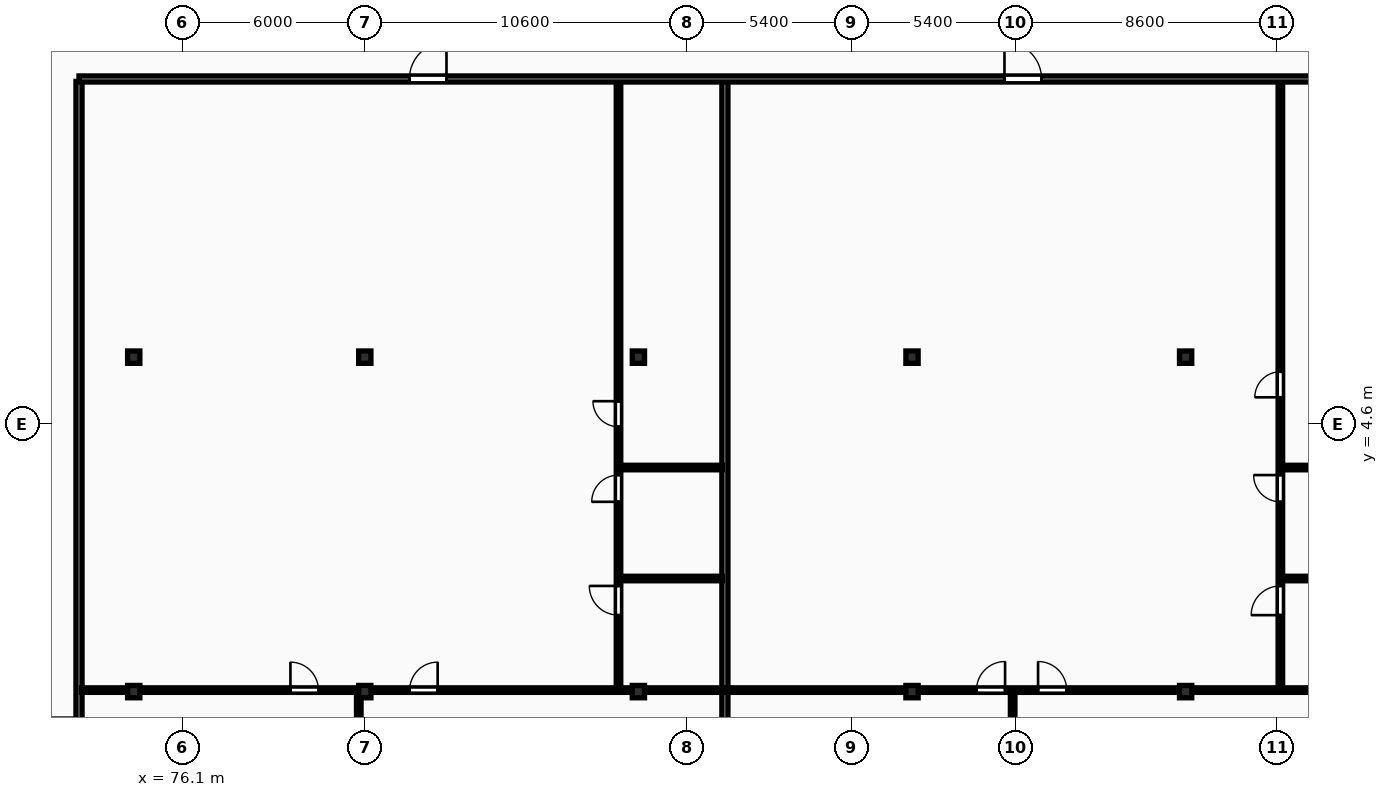
"""IFC4 building model, lengths in metres.
Left out: names, types, materials, properties, quantities, classifications, styles, units other than length and angle.
Written with IfcOpenShell. Run it as: python <this file> out.ifc"""

import sys

from ifc_helpers import new_model, si_unit, direction, frame, frame_2d, origin, origin_2d, place, context, subcontext, project, spatial, rectangle, i_section, extrude, element, fill, save


model = new_model("IFC4")
c1 = context("Model", 3, precision=1e-05, world=origin(), true_north=direction((0.0, 1.0)))
c2 = subcontext(c1, "Body", "Model", "MODEL_VIEW")
j1 = project(units=[si_unit("LENGTHUNIT", "METRE"), si_unit("PLANEANGLEUNIT", "RADIAN")], contexts=[c1])
p1 = place(None, origin())
s1 = spatial("IfcSite", under=j1, at=p1, CompositionType="ELEMENT")
p2 = place(p1, origin())
s2 = spatial("IfcBuilding", under=s1, at=p2, CompositionType="ELEMENT")
p3 = place(p2, frame((0.0, 0.0, 150.1)))
s3 = spatial("IfcBuildingStorey", under=s2, at=p3, CompositionType="ELEMENT", Elevation=150.1)
for number, where, z_axis, x_axis in (
    (1, (74.5, -4.2, 0.0), (0.0, 0.0, 1.0), (1.0, 0.0, 0.0)),
    (2, (74.5, 6.8, 0.0), (0.0, 0.0, 1.0), (1.0, 0.0, 0.0)),
    (3, (82.1, -4.2, 0.0), (0.0, 0.0, 1.0), (1.0, 0.0, 0.0)),
    (4, (82.1, 6.8, 0.0), (0.0, 0.0, 1.0), (1.0, 0.0, 0.0)),
    (5, (91.1, -4.2, 0.0), (0.0, 0.0, 1.0), (1.0, 0.0, 0.0)),
    (6, (91.1, 6.8, 0.0), (0.0, 0.0, 1.0), (1.0, 0.0, 0.0)),
    (7, (100.1, -4.2, 0.0), (0.0, 0.0, 1.0), (1.0, 0.0, 0.0)),
    (8, (100.1, 6.8, 0.0), (0.0, 0.0, 1.0), (1.0, 0.0, 0.0)),
    (9, (109.1, -4.2, 0.0), (0.0, 0.0, 1.0), (1.0, 0.0, 0.0)),
    (10, (109.1, 6.8, 0.0), (0.0, 0.0, 1.0), (1.0, 0.0, 0.0)),
):
    element("IfcColumn", number, at=place(p3, frame(where, z_axis=z_axis, x_axis=x_axis)), inside=s3, PredefinedType="COLUMN", context=c2, shape_type="SweptSolid", body=[
        extrude(i_section(OverallWidth=0.403, OverallDepth=0.406, WebThickness=0.027, FlangeThickness=0.043, FilletRadius=0.015, at=origin_2d()), origin(), (0.0, 0.0, 1.0), 3.6),
    ])
for number, where, z_axis, x_axis in (
    (11, (72.7, -8.7, 0.0), (0.0, 0.0, 1.0), (0.0, 1.0, 0.0)),
    (12, (93.946, -8.7, 0.0), (0.0, 0.0, 1.0), (0.0, 1.0, 0.0)),
):
    element("IfcWall", number, at=place(p3, frame(where, z_axis=z_axis, x_axis=x_axis)), inside=s3, PredefinedType="PARTITIONING", context=c2, shape_type="SweptSolid", body=[
        extrude(rectangle(XDim=24.57, YDim=0.2, at=frame_2d((12.285, 0.0))), origin(), (0.0, 0.0, 1.0), 3.31),
    ])
for number, where, z_axis, x_axis in (
    (13, (90.506, -0.48, 0.0), (0.0, 0.0, 1.0), (1.0, 0.0, 0.0)),
    (14, (90.506, 3.17, 0.0), (0.0, 0.0, 1.0), (1.0, 0.0, 0.0)),
):
    element("IfcWall", number, at=place(p3, frame(where, z_axis=z_axis, x_axis=x_axis)), inside=s3, PredefinedType="PARTITIONING", context=c2, shape_type="SweptSolid", body=[
        extrude(rectangle(XDim=3.36, YDim=0.15, at=frame_2d((1.68, 0.0))), origin(), (0.0, 0.0, 1.0), 3.31),
    ])
p4 = place(p3, frame((90.446, -4.09, 0.0), z_axis=(0.0, 0.0, 1.0), x_axis=(0.0, 1.0, 0.0)))
e15 = element("IfcWall", 15, at=p4, inside=s3, PredefinedType="PARTITIONING", context=c2, shape_type="SweptSolid", body=[
    extrude(rectangle(XDim=19.98, YDim=0.15, at=frame_2d((9.99, 0.0))), origin(), (0.0, 0.0, 1.0), 3.31),
])
p5 = place(p4, frame((2.406, 0.0, 0.0)))
e16 = element("IfcOpeningElement", 16, at=p5, cuts=e15, PredefinedType="OPENING", context=c2, shape_type="SweptSolid", body=[
    extrude(rectangle(XDim=0.96, YDim=2.1, at=frame_2d((0.48, 1.05))), frame((0.0, 0.085, 0.0), z_axis=(0.0, -1.0, 0.0), x_axis=(1.0, 0.0, 0.0)), (0.0, 0.0, 1.0), 0.17),
])
p6 = place(p4, frame((6.133, 0.0, 0.0)))
e17 = element("IfcOpeningElement", 17, at=p6, cuts=e15, PredefinedType="OPENING", context=c2, shape_type="SweptSolid", body=[
    extrude(rectangle(XDim=0.88, YDim=2.06, at=frame_2d((0.44, 1.03))), frame((0.0, 0.085, 0.0), z_axis=(0.0, -1.0, 0.0), x_axis=(1.0, 0.0, 0.0)), (0.0, 0.0, 1.0), 0.17),
])
p7 = place(p4, frame((8.602, 0.0, 0.0)))
e18 = element("IfcOpeningElement", 18, at=p7, cuts=e15, PredefinedType="OPENING", context=c2, shape_type="SweptSolid", body=[
    extrude(rectangle(XDim=0.84, YDim=2.04, at=frame_2d((0.42, 1.02))), frame((0.0, 0.085, 0.0), z_axis=(0.0, -1.0, 0.0), x_axis=(1.0, 0.0, 0.0)), (0.0, 0.0, 1.0), 0.17),
])
p8 = place(p3, frame((81.903, -8.7, 0.0), z_axis=(0.0, 0.0, 1.0), x_axis=(0.0, 1.0, 0.0)))
e19 = element("IfcWall", 19, at=p8, inside=s3, PredefinedType="PARTITIONING", context=c2, shape_type="SweptSolid", body=[
    extrude(rectangle(XDim=4.47, YDim=0.15, at=frame_2d((2.235, 0.0))), origin(), (0.0, 0.0, 1.0), 3.31),
])
p9 = place(p3, frame((72.78, -4.15, 0.0), z_axis=(0.0, 0.0, 1.0), x_axis=(1.0, 0.0, 0.0)))
e20 = element("IfcWall", 20, at=p9, inside=s3, PredefinedType="PARTITIONING", context=c2, shape_type="SweptSolid", body=[
    extrude(rectangle(XDim=21.085, YDim=0.15, at=frame_2d((10.543, 0.0))), origin(), (0.0, 0.0, 1.0), 3.003),
])
p10 = place(p9, frame((6.874, 0.0, 0.0)))
e21 = element("IfcOpeningElement", 21, at=p10, cuts=e20, PredefinedType="OPENING", context=c2, shape_type="SweptSolid", body=[
    extrude(rectangle(XDim=0.92, YDim=2.08, at=frame_2d((0.46, 1.04))), frame((0.0, 0.085, 0.0), z_axis=(0.0, -1.0, 0.0), x_axis=(1.0, 0.0, 0.0)), (0.0, 0.0, 1.0), 0.17),
])
p11 = place(p9, frame((10.797, 0.0, 0.0)))
e22 = element("IfcOpeningElement", 22, at=p11, cuts=e20, PredefinedType="OPENING", context=c2, shape_type="SweptSolid", body=[
    extrude(rectangle(XDim=0.92, YDim=2.08, at=frame_2d((0.46, 1.04))), frame((0.0, 0.085, 0.0), z_axis=(0.0, -1.0, 0.0), x_axis=(1.0, 0.0, 0.0)), (0.0, 0.0, 1.0), 0.17),
])
for number, where, z_axis, x_axis in (
    (23, (112.276, -0.48, 0.0), (0.0, 0.0, 1.0), (1.0, 0.0, 0.0)),
    (24, (112.276, 3.17, 0.0), (0.0, 0.0, 1.0), (1.0, 0.0, 0.0)),
):
    element("IfcWall", number, at=place(p3, frame(where, z_axis=z_axis, x_axis=x_axis)), inside=s3, PredefinedType="PARTITIONING", context=c2, shape_type="SweptSolid", body=[
        extrude(rectangle(XDim=3.13, YDim=0.15, at=frame_2d((1.565, 0.0))), origin(), (0.0, 0.0, 1.0), 3.31),
    ])
p12 = place(p3, frame((112.216, -4.09, 0.0), z_axis=(0.0, 0.0, 1.0), x_axis=(0.0, 1.0, 0.0)))
e25 = element("IfcWall", 25, at=p12, inside=s3, PredefinedType="PARTITIONING", context=c2, shape_type="SweptSolid", body=[
    extrude(rectangle(XDim=19.98, YDim=0.15, at=frame_2d((9.99, 0.0))), origin(), (0.0, 0.0, 1.0), 3.31),
])
p13 = place(p12, frame((2.406, 0.0, 0.0)))
e26 = element("IfcOpeningElement", 26, at=p13, cuts=e25, PredefinedType="OPENING", context=c2, shape_type="SweptSolid", body=[
    extrude(rectangle(XDim=0.96, YDim=2.1, at=frame_2d((0.48, 1.05))), frame((0.0, 0.085, 0.0), z_axis=(0.0, -1.0, 0.0), x_axis=(1.0, 0.0, 0.0)), (0.0, 0.0, 1.0), 0.17),
])
p14 = place(p12, frame((6.133, 0.0, 0.0)))
e27 = element("IfcOpeningElement", 27, at=p14, cuts=e25, PredefinedType="OPENING", context=c2, shape_type="SweptSolid", body=[
    extrude(rectangle(XDim=0.88, YDim=2.06, at=frame_2d((0.44, 1.03))), frame((0.0, 0.085, 0.0), z_axis=(0.0, -1.0, 0.0), x_axis=(1.0, 0.0, 0.0)), (0.0, 0.0, 1.0), 0.17),
])
p15 = place(p12, frame((9.57, 0.0, 0.0)))
e28 = element("IfcOpeningElement", 28, at=p15, cuts=e25, PredefinedType="OPENING", context=c2, shape_type="SweptSolid", body=[
    extrude(rectangle(XDim=0.84, YDim=2.04, at=frame_2d((0.42, 1.02))), frame((0.0, 0.085, 0.0), z_axis=(0.0, -1.0, 0.0), x_axis=(1.0, 0.0, 0.0)), (0.0, 0.0, 1.0), 0.17),
])
p16 = place(p3, frame((103.411, -8.7, 0.0), z_axis=(0.0, 0.0, 1.0), x_axis=(0.0, 1.0, 0.0)))
e29 = element("IfcWall", 29, at=p16, inside=s3, PredefinedType="PARTITIONING", context=c2, shape_type="SweptSolid", body=[
    extrude(rectangle(XDim=4.47, YDim=0.15, at=frame_2d((2.235, 0.0))), origin(), (0.0, 0.0, 1.0), 3.31),
])
p17 = place(p3, frame((94.025, -4.15, 0.0), z_axis=(0.0, 0.0, 1.0), x_axis=(1.0, 0.0, 0.0)))
e30 = element("IfcWall", 30, at=p17, inside=s3, PredefinedType="PARTITIONING", context=c2, shape_type="SweptSolid", body=[
    extrude(rectangle(XDim=21.381, YDim=0.15, at=frame_2d((10.69, 0.0))), origin(), (0.0, 0.0, 1.0), 3.003),
])
p18 = place(p17, frame((8.195, 0.0, 0.0)))
e31 = element("IfcOpeningElement", 31, at=p18, cuts=e30, PredefinedType="OPENING", context=c2, shape_type="SweptSolid", body=[
    extrude(rectangle(XDim=0.94, YDim=2.1, at=frame_2d((0.47, 1.05))), frame((0.0, 0.085, 0.0), z_axis=(0.0, -1.0, 0.0), x_axis=(1.0, 0.0, 0.0)), (0.0, 0.0, 1.0), 0.17),
])
p19 = place(p17, frame((10.22, 0.0, 0.0)))
e32 = element("IfcOpeningElement", 32, at=p19, cuts=e30, PredefinedType="OPENING", context=c2, shape_type="SweptSolid", body=[
    extrude(rectangle(XDim=0.94, YDim=2.1, at=frame_2d((0.47, 1.05))), frame((0.0, 0.085, 0.0), z_axis=(0.0, -1.0, 0.0), x_axis=(1.0, 0.0, 0.0)), (0.0, 0.0, 1.0), 0.17),
])
p20 = place(p3, frame((72.7, 15.95, 0.0), z_axis=(0.0, 0.0, 1.0), x_axis=(1.0, 0.0, 0.0)))
e33 = element("IfcWall", 33, at=p20, inside=s3, PredefinedType="PARTITIONING", context=c2, shape_type="SweptSolid", body=[
    extrude(rectangle(XDim=58.0, YDim=0.2, at=frame_2d((29.0, 0.0))), origin(), (0.0, 0.0, 1.0), 3.31),
])
p21 = place(p20, frame((10.868, 0.0, 0.0)))
e34 = element("IfcOpeningElement", 34, at=p21, cuts=e33, PredefinedType="OPENING", context=c2, shape_type="SweptSolid", body=[
    extrude(rectangle(XDim=1.22, YDim=2.18, at=frame_2d((0.61, 1.09))), frame((0.0, 0.11, 0.0), z_axis=(0.0, -1.0, 0.0), x_axis=(1.0, 0.0, 0.0)), (0.0, 0.0, 1.0), 0.22),
])
p22 = place(p20, frame((30.441, 0.0, 0.0)))
e35 = element("IfcOpeningElement", 35, at=p22, cuts=e33, PredefinedType="OPENING", context=c2, shape_type="SweptSolid", body=[
    extrude(rectangle(XDim=1.22, YDim=2.18, at=frame_2d((0.61, 1.09))), frame((0.0, 0.11, 0.0), z_axis=(0.0, -1.0, 0.0), x_axis=(1.0, 0.0, 0.0)), (0.0, 0.0, 1.0), 0.22),
])
p23 = place(p20, frame((44.831, 0.0, 0.0)))
e36 = element("IfcOpeningElement", 36, at=p23, cuts=e33, PredefinedType="OPENING", context=c2, shape_type="SweptSolid", body=[
    extrude(rectangle(XDim=0.95, YDim=2.15, at=frame_2d((0.475, 1.075))), frame((0.0, 0.11, 0.0), z_axis=(0.0, -1.0, 0.0), x_axis=(1.0, 0.0, 0.0)), (0.0, 0.0, 1.0), 0.22),
])
p24 = place(p5, origin())
e37 = element("IfcDoor", 37, at=p24, inside=s3, OperationType="SINGLE_SWING_RIGHT", PredefinedType="DOOR", context=c2, shape_type="SweptSolid", body=[
    extrude(rectangle(XDim=0.96, YDim=2.1, at=frame_2d((0.48, 1.05))), frame((0.0, 0.025, 0.0), z_axis=(0.0, -1.0, 0.0), x_axis=(1.0, 0.0, 0.0)), (0.0, 0.0, 1.0), 0.05),
])
fill(e16, e37)
p25 = place(p6, origin())
e38 = element("IfcDoor", 38, at=p25, inside=s3, OperationType="SINGLE_SWING_LEFT", PredefinedType="DOOR", context=c2, shape_type="SweptSolid", body=[
    extrude(rectangle(XDim=0.88, YDim=2.06, at=frame_2d((0.44, 1.03))), frame((0.0, 0.025, 0.0), z_axis=(0.0, -1.0, 0.0), x_axis=(1.0, 0.0, 0.0)), (0.0, 0.0, 1.0), 0.05),
])
fill(e17, e38)
p26 = place(p7, origin())
e39 = element("IfcDoor", 39, at=p26, inside=s3, OperationType="SINGLE_SWING_RIGHT", PredefinedType="DOOR", context=c2, shape_type="SweptSolid", body=[
    extrude(rectangle(XDim=0.84, YDim=2.04, at=frame_2d((0.42, 1.02))), frame((0.0, 0.025, 0.0), z_axis=(0.0, -1.0, 0.0), x_axis=(1.0, 0.0, 0.0)), (0.0, 0.0, 1.0), 0.05),
])
fill(e18, e39)
p27 = place(p10, origin())
e40 = element("IfcDoor", 40, at=p27, inside=s3, OperationType="SINGLE_SWING_LEFT", PredefinedType="DOOR", context=c2, shape_type="SweptSolid", body=[
    extrude(rectangle(XDim=0.92, YDim=2.08, at=frame_2d((0.46, 1.04))), frame((0.0, 0.025, 0.0), z_axis=(0.0, -1.0, 0.0), x_axis=(1.0, 0.0, 0.0)), (0.0, 0.0, 1.0), 0.05),
])
fill(e21, e40)
p28 = place(p11, origin())
e41 = element("IfcDoor", 41, at=p28, inside=s3, OperationType="SINGLE_SWING_RIGHT", PredefinedType="DOOR", context=c2, shape_type="SweptSolid", body=[
    extrude(rectangle(XDim=0.92, YDim=2.08, at=frame_2d((0.46, 1.04))), frame((0.0, 0.025, 0.0), z_axis=(0.0, -1.0, 0.0), x_axis=(1.0, 0.0, 0.0)), (0.0, 0.0, 1.0), 0.05),
])
fill(e22, e41)
p29 = place(p13, origin())
e42 = element("IfcDoor", 42, at=p29, inside=s3, OperationType="SINGLE_SWING_LEFT", PredefinedType="DOOR", context=c2, shape_type="SweptSolid", body=[
    extrude(rectangle(XDim=0.96, YDim=2.1, at=frame_2d((0.48, 1.05))), frame((0.0, 0.025, 0.0), z_axis=(0.0, -1.0, 0.0), x_axis=(1.0, 0.0, 0.0)), (0.0, 0.0, 1.0), 0.05),
])
fill(e26, e42)
p30 = place(p14, origin())
e43 = element("IfcDoor", 43, at=p30, inside=s3, OperationType="SINGLE_SWING_RIGHT", PredefinedType="DOOR", context=c2, shape_type="SweptSolid", body=[
    extrude(rectangle(XDim=0.88, YDim=2.06, at=frame_2d((0.44, 1.03))), frame((0.0, 0.025, 0.0), z_axis=(0.0, -1.0, 0.0), x_axis=(1.0, 0.0, 0.0)), (0.0, 0.0, 1.0), 0.05),
])
fill(e27, e43)
p31 = place(p15, origin())
e44 = element("IfcDoor", 44, at=p31, inside=s3, OperationType="SINGLE_SWING_LEFT", PredefinedType="DOOR", context=c2, shape_type="SweptSolid", body=[
    extrude(rectangle(XDim=0.84, YDim=2.04, at=frame_2d((0.42, 1.02))), frame((0.0, 0.025, 0.0), z_axis=(0.0, -1.0, 0.0), x_axis=(1.0, 0.0, 0.0)), (0.0, 0.0, 1.0), 0.05),
])
fill(e28, e44)
p32 = place(p18, origin())
e45 = element("IfcDoor", 45, at=p32, inside=s3, OperationType="SINGLE_SWING_RIGHT", PredefinedType="DOOR", context=c2, shape_type="SweptSolid", body=[
    extrude(rectangle(XDim=0.94, YDim=2.1, at=frame_2d((0.47, 1.05))), frame((0.0, 0.025, 0.0), z_axis=(0.0, -1.0, 0.0), x_axis=(1.0, 0.0, 0.0)), (0.0, 0.0, 1.0), 0.05),
])
fill(e31, e45)
p33 = place(p19, origin())
e46 = element("IfcDoor", 46, at=p33, inside=s3, OperationType="SINGLE_SWING_LEFT", PredefinedType="DOOR", context=c2, shape_type="SweptSolid", body=[
    extrude(rectangle(XDim=0.94, YDim=2.1, at=frame_2d((0.47, 1.05))), frame((0.0, 0.025, 0.0), z_axis=(0.0, -1.0, 0.0), x_axis=(1.0, 0.0, 0.0)), (0.0, 0.0, 1.0), 0.05),
])
fill(e32, e46)
p34 = place(p21, origin())
e47 = element("IfcDoor", 47, at=p34, inside=s3, OperationType="SINGLE_SWING_RIGHT", PredefinedType="DOOR", context=c2, shape_type="SweptSolid", body=[
    extrude(rectangle(XDim=1.22, YDim=2.18, at=frame_2d((0.61, 1.09))), frame((0.0, 0.025, 0.0), z_axis=(0.0, -1.0, 0.0), x_axis=(1.0, 0.0, 0.0)), (0.0, 0.0, 1.0), 0.05),
])
fill(e34, e47)
p35 = place(p22, origin())
e48 = element("IfcDoor", 48, at=p35, inside=s3, OperationType="SINGLE_SWING_LEFT", PredefinedType="DOOR", context=c2, shape_type="SweptSolid", body=[
    extrude(rectangle(XDim=1.22, YDim=2.18, at=frame_2d((0.61, 1.09))), frame((0.0, 0.025, 0.0), z_axis=(0.0, -1.0, 0.0), x_axis=(1.0, 0.0, 0.0)), (0.0, 0.0, 1.0), 0.05),
])
fill(e35, e48)
save(model, sys.argv[1])
